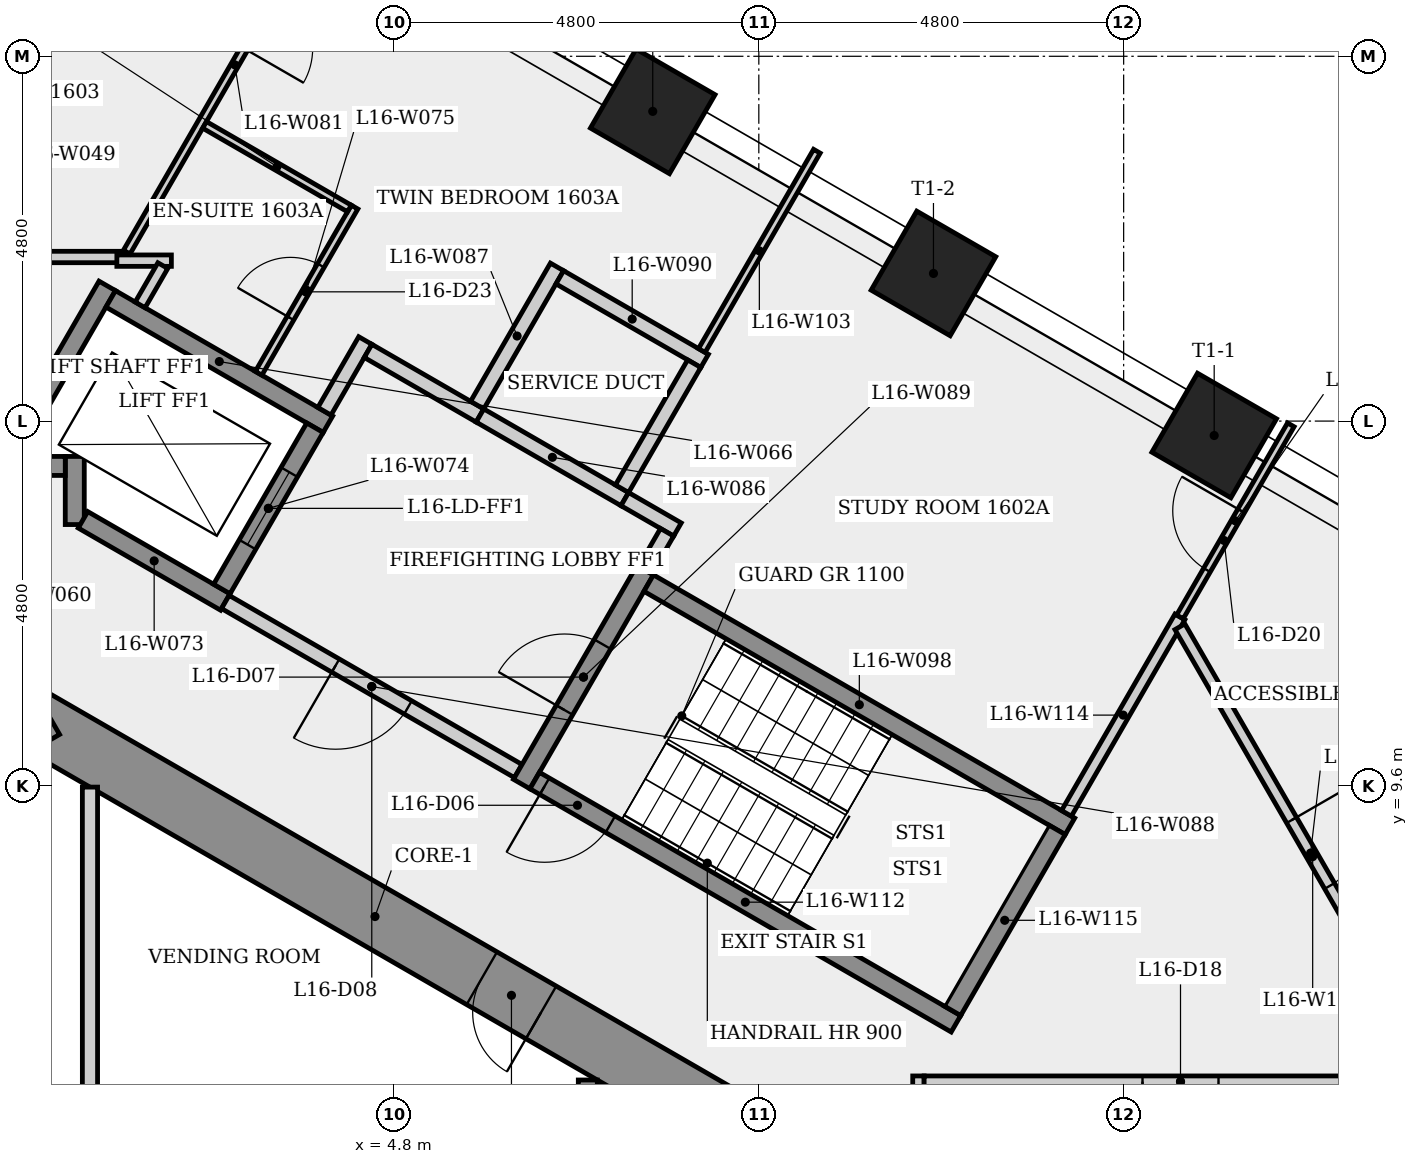
"""IFC4 building model, lengths in metres.
Left out: names, types, materials, properties, quantities, classifications, styles, units other than length and angle.
Written with IfcOpenShell. Run it as: python <this file> out.ifc"""

import sys

from ifc_helpers import new_model, si_unit, direction, frame, frame_2d, origin, origin_2d, place, context, subcontext, project, spatial, rectangle, extrude, element, fill, save


model = new_model("IFC4")
c1 = context("Model", 3, precision=1e-05, world=origin(), true_north=direction((0.0, 1.0)))
c2 = subcontext(c1, "Body", "Model", "MODEL_VIEW")
j1 = project(units=[si_unit("LENGTHUNIT", "METRE"), si_unit("PLANEANGLEUNIT", "RADIAN")], contexts=[c1])
p1 = place(None, origin())
s1 = spatial("IfcSite", under=j1, at=p1, CompositionType="ELEMENT")
p2 = place(p1, origin())
s2 = spatial("IfcBuilding", under=s1, at=p2, CompositionType="ELEMENT")
p3 = place(p2, frame((0.0, 0.0, 62.9)))
s3 = spatial("IfcBuildingStorey", under=s2, at=p3, CompositionType="ELEMENT", Elevation=62.9)
p4 = place(p3, frame((9.3, 5.138, 0.0), z_axis=(0.0, 0.0, 1.0), x_axis=(-0.866023993627, 0.500002442456, 0.0)))
e1 = element("IfcWall", 1, at=p4, inside=s3, PredefinedType="SHEAR", context=c2, shape_type="SweptSolid", body=[
    extrude(rectangle(XDim=10.97, YDim=0.8, at=frame_2d((5.485, 0.0))), origin(), (0.0, 0.0, 1.0), 3.4),
])
p5 = place(p4, frame((2.962, 0.0, 0.0)))
e2 = element("IfcOpeningElement", 2, at=p5, cuts=e1, PredefinedType="OPENING", context=c2, shape_type="SweptSolid", body=[
    extrude(rectangle(XDim=0.9, YDim=2.1, at=frame_2d((0.45, 1.05))), frame((0.0, 0.41, 0.0), z_axis=(0.0, -1.0, 0.0), x_axis=(1.0, 0.0, 0.0)), (0.0, 0.0, 1.0), 0.82),
])
p6 = place(p3, frame((0.2, 10.623, 0.0), z_axis=(0.0, 0.0, 1.0), x_axis=(-0.866023993627, -0.500002442456, 0.0)))
e3 = element("IfcWall", 3, at=p6, inside=s3, PredefinedType="SHEAR", context=c2, shape_type="SweptSolid", body=[
    extrude(rectangle(XDim=10.97, YDim=0.8, at=frame_2d((5.485, 0.0))), origin(), (0.0, 0.0, 1.0), 3.4),
])
p7 = place(p6, frame((9.325, 0.0, 0.0)))
e4 = element("IfcOpeningElement", 4, at=p7, cuts=e3, PredefinedType="OPENING", context=c2, shape_type="SweptSolid", body=[
    extrude(rectangle(XDim=0.9, YDim=2.1, at=frame_2d((0.45, 1.05))), frame((0.0, 0.41, 0.0), z_axis=(0.0, -1.0, 0.0), x_axis=(1.0, 0.0, 0.0)), (0.0, 0.0, 1.0), 0.82),
])
p8 = place(p6, frame((2.091, 0.0, 0.0)))
e5 = element("IfcOpeningElement", 5, at=p8, cuts=e3, PredefinedType="OPENING", context=c2, shape_type="SweptSolid", body=[
    extrude(rectangle(XDim=0.9, YDim=2.1, at=frame_2d((0.45, 1.05))), frame((0.0, 0.41, 0.0), z_axis=(0.0, -1.0, 0.0), x_axis=(1.0, 0.0, 0.0)), (0.0, 0.0, 1.0), 0.82),
])
for number, where, z_axis, x_axis in (
    (6, (15.591, 14.21, 0.0), (0.0, 0.0, 1.0), (0.5, 0.866, 0.0)),
    (7, (11.898, 16.343, 0.0), (0.0, 0.0, 1.0), (0.5, 0.866, 0.0)),
    (8, (8.204, 18.475, 0.0), (0.0, 0.0, 1.0), (0.5, 0.866, 0.0)),
):
    element("IfcColumn", number, at=place(p3, frame(where, z_axis=z_axis, x_axis=x_axis)), inside=s3, PredefinedType="COLUMN", context=c2, shape_type="SweptSolid", body=[
        extrude(rectangle(XDim=1.2, YDim=1.2, at=origin_2d()), origin(), (0.0, 0.0, 1.0), 3.4),
    ])
p9 = place(p3, frame((-3.044, 16.559, 0.0), z_axis=(0.0, 0.0, 1.0), x_axis=(1.0, 0.0, 0.0)))
e9 = element("IfcWall", 9, at=p9, inside=s3, PredefinedType="PARTITIONING", context=c2, shape_type="SweptSolid", body=[
    extrude(rectangle(XDim=4.365, YDim=0.15, at=frame_2d((2.183, 0.0))), origin(), (0.0, 0.0, 1.0), 3.0),
])
p10 = place(p9, frame((1.683, 0.0, 0.0)))
e10 = element("IfcOpeningElement", 10, at=p10, cuts=e9, PredefinedType="OPENING", context=c2, shape_type="SweptSolid", body=[
    extrude(rectangle(XDim=1.0, YDim=2.1, at=frame_2d((0.5, 1.05))), frame((0.0, 0.085, 0.0), z_axis=(0.0, -1.0, 0.0), x_axis=(1.0, 0.0, 0.0)), (0.0, 0.0, 1.0), 0.17),
])
p11 = place(p3, frame((-0.403, 13.702, 0.0), z_axis=(0.0, 0.0, 1.0), x_axis=(0.499976111731, 0.866039195244, 0.0)))
e11 = element("IfcWall", 11, at=p11, inside=s3, PredefinedType="SHEAR", context=c2, shape_type="SweptSolid", body=[
    extrude(rectangle(XDim=2.861, YDim=0.25, at=frame_2d((1.43, 0.0))), origin(), (0.0, 0.0, 1.0), 3.0),
])
p12 = place(p3, frame((0.6, 13.039, 0.0), z_axis=(0.0, 0.0, 1.0), x_axis=(0.0, 1.0, 0.0)))
e12 = element("IfcWall", 12, at=p12, inside=s3, PredefinedType="SHEAR", context=c2, shape_type="SweptSolid", body=[
    extrude(rectangle(XDim=0.896, YDim=0.25, at=frame_2d((0.448, 0.0))), origin(), (0.0, 0.0, 1.0), 3.0),
])
p13 = place(p3, frame((0.475, 13.81, 0.0), z_axis=(0.0, 0.0, 1.0), x_axis=(-1.0, 0.0, 0.0)))
e13 = element("IfcWall", 13, at=p13, inside=s3, PredefinedType="SHEAR", context=c2, shape_type="SweptSolid", body=[
    extrude(rectangle(XDim=0.691, YDim=0.25, at=frame_2d((0.345, 0.0))), origin(), (0.0, 0.0, 1.0), 3.4),
])
p14 = place(p3, frame((0.8, 9.584, 0.0), z_axis=(0.0, 0.0, 1.0), x_axis=(0.0, -1.0, 0.0)))
e14 = element("IfcWall", 14, at=p14, inside=s3, PredefinedType="PARTITIONING", context=c2, shape_type="SweptSolid", body=[
    extrude(rectangle(XDim=4.309, YDim=0.2, at=frame_2d((2.155, 0.0))), origin(), (0.0, 0.0, 1.0), 3.0),
])
p15 = place(p3, frame((1.073, 16.008, 0.0), z_axis=(0.0, 0.0, 1.0), x_axis=(0.866040211805, -0.499974350878, 0.0)))
e15 = element("IfcWall", 15, at=p15, inside=s3, PredefinedType="SHEAR", context=c2, shape_type="SweptSolid", body=[
    extrude(rectangle(XDim=3.3, YDim=0.25, at=frame_2d((1.65, 0.0))), origin(), (0.0, 0.0, 1.0), 3.0),
])
p16 = place(p3, frame((1.154, 16.511, 0.0), z_axis=(0.0, 0.0, 1.0), x_axis=(1.0, 0.0, 0.0)))
e16 = element("IfcWall", 16, at=p16, inside=s3, PredefinedType="PARTITIONING", context=c2, shape_type="SweptSolid", body=[
    extrude(rectangle(XDim=0.717, YDim=0.15, at=frame_2d((0.359, 0.0))), origin(), (0.0, 0.0, 1.0), 3.0),
])
p17 = place(p3, frame((1.759, 16.446, 0.0), z_axis=(0.0, 0.0, 1.0), x_axis=(-0.499746055734, -0.86617196894, 0.0)))
e17 = element("IfcWall", 17, at=p17, inside=s3, PredefinedType="PARTITIONING", context=c2, shape_type="SweptSolid", body=[
    extrude(rectangle(XDim=0.597, YDim=0.15, at=frame_2d((0.298, 0.0))), origin(), (0.0, 0.0, 1.0), 3.0),
])
p18 = place(p3, frame((2.581, 12.02, 0.0), z_axis=(0.0, 0.0, 1.0), x_axis=(-0.86603892542, 0.499976579108, 0.0)))
e18 = element("IfcWall", 18, at=p18, inside=s3, PredefinedType="SHEAR", context=c2, shape_type="SweptSolid", body=[
    extrude(rectangle(XDim=2.162, YDim=0.25, at=frame_2d((1.081, 0.0))), origin(), (0.0, 0.0, 1.0), 3.0),
])
p19 = place(p3, frame((2.535, 12.191, 0.0), z_axis=(0.0, 0.0, 1.0), x_axis=(0.500061746146, 0.865989751695, 0.0)))
e19 = element("IfcWall", 19, at=p19, inside=s3, PredefinedType="SHEAR", context=c2, shape_type="SweptSolid", body=[
    extrude(rectangle(XDim=2.45, YDim=0.25, at=frame_2d((1.225, 0.0))), origin(), (0.0, 0.0, 1.0), 3.4),
])
p20 = place(p19, frame((0.675, 0.0, 0.0)))
e20 = element("IfcOpeningElement", 20, at=p20, cuts=e19, PredefinedType="OPENING", context=c2, shape_type="SweptSolid", body=[
    extrude(rectangle(XDim=1.1, YDim=2.1, at=frame_2d((0.55, 1.05))), frame((0.0, 0.135, 0.0), z_axis=(0.0, -1.0, 0.0), x_axis=(1.0, 0.0, 0.0)), (0.0, 0.0, 1.0), 0.27),
])
p21 = place(p3, frame((3.019, 15.029, 0.0), z_axis=(0.0, 0.0, 1.0), x_axis=(0.499976333282, 0.866039067339, 0.0)))
e21 = element("IfcWall", 21, at=p21, inside=s3, PredefinedType="PARTITIONING", context=c2, shape_type="SweptSolid", body=[
    extrude(rectangle(XDim=2.525, YDim=0.1, at=frame_2d((1.262, 0.0))), origin(), (0.0, 0.0, 1.0), 3.0),
])
p22 = place(p21, frame((0.837, 0.0, 0.0)))
e22 = element("IfcOpeningElement", 22, at=p22, cuts=e21, PredefinedType="OPENING", context=c2, shape_type="SweptSolid", body=[
    extrude(rectangle(XDim=0.8, YDim=2.1, at=frame_2d((0.4, 1.05))), frame((0.0, 0.06, 0.0), z_axis=(0.0, -1.0, 0.0), x_axis=(1.0, 0.0, 0.0)), (0.0, 0.0, 1.0), 0.12),
])
p23 = place(p3, frame((3.885, 14.529, 0.0), z_axis=(0.0, 0.0, 1.0), x_axis=(0.499997628298, 0.866026773083, 0.0)))
e23 = element("IfcWall", 23, at=p23, inside=s3, PredefinedType="PARTITIONING", context=c2, shape_type="SweptSolid", body=[
    extrude(rectangle(XDim=1.075, YDim=0.2, at=frame_2d((0.538, 0.0))), origin(), (0.0, 0.0, 1.0), 3.0),
])
p24 = place(p3, frame((4.128, 21.551, 0.0), z_axis=(0.0, 0.0, 1.0), x_axis=(-0.499983721286, -0.8660348021, 0.0)))
e24 = element("IfcWall", 24, at=p24, inside=s3, PredefinedType="PARTITIONING", context=c2, shape_type="SweptSolid", body=[
    extrude(rectangle(XDim=5.689, YDim=0.1, at=frame_2d((2.845, 0.0))), origin(), (0.0, 0.0, 1.0), 3.0),
])
p25 = place(p24, frame((1.697, 0.0, 0.0)))
e25 = element("IfcOpeningElement", 25, at=p25, cuts=e24, PredefinedType="OPENING", context=c2, shape_type="SweptSolid", body=[
    extrude(rectangle(XDim=0.9, YDim=2.1, at=frame_2d((0.45, 1.05))), frame((0.0, 0.06, 0.0), z_axis=(0.0, -1.0, 0.0), x_axis=(1.0, 0.0, 0.0)), (0.0, 0.0, 1.0), 0.12),
])
p26 = place(p3, frame((4.213, 17.198, 0.0), z_axis=(0.0, 0.0, 1.0), x_axis=(-0.86605622881, 0.499946605688, 0.0)))
e26 = element("IfcWall", 26, at=p26, inside=s3, PredefinedType="PARTITIONING", context=c2, shape_type="SweptSolid", body=[
    extrude(rectangle(XDim=2.2, YDim=0.1, at=frame_2d((1.1, 0.0))), origin(), (0.0, 0.0, 1.0), 3.0),
])
p27 = place(p3, frame((4.459, 15.323, 0.0), z_axis=(0.0, 0.0, 1.0), x_axis=(0.866025371046, -0.500000056704, 0.0)))
e27 = element("IfcWall", 27, at=p27, inside=s3, PredefinedType="PARTITIONING", context=c2, shape_type="SweptSolid", body=[
    extrude(rectangle(XDim=1.7, YDim=0.2, at=frame_2d((0.85, 0.0))), origin(), (0.0, 0.0, 1.0), 3.0),
])
p28 = place(p3, frame((5.931, 14.473, 0.0), z_axis=(0.0, 0.0, 1.0), x_axis=(0.866008176907, -0.50002983664, 0.0)))
e28 = element("IfcWall", 28, at=p28, inside=s3, PredefinedType="PLUMBINGWALL", context=c2, shape_type="SweptSolid", body=[
    extrude(rectangle(XDim=2.2, YDim=0.2, at=frame_2d((1.1, 0.0))), origin(), (0.0, 0.0, 1.0), 3.0),
])
p29 = place(p3, frame((5.895, 14.61, 0.0), z_axis=(0.0, 0.0, 1.0), x_axis=(0.49994051562, 0.866059744384, 0.0)))
e29 = element("IfcWall", 29, at=p29, inside=s3, PredefinedType="PLUMBINGWALL", context=c2, shape_type="SweptSolid", body=[
    extrude(rectangle(XDim=2.1, YDim=0.2, at=frame_2d((1.05, 0.0))), origin(), (0.0, 0.0, 1.0), 3.0),
])
p30 = place(p3, frame((6.435, 9.795, 0.0), z_axis=(0.0, 0.0, 1.0), x_axis=(-0.866012907634, 0.500021643343, 0.0)))
e30 = element("IfcWall", 30, at=p30, inside=s3, PredefinedType="PARTITIONING", context=c2, shape_type="SweptSolid", body=[
    extrude(rectangle(XDim=4.45, YDim=0.2, at=frame_2d((2.225, 0.0))), origin(), (0.0, 0.0, 1.0), 3.0),
])
p31 = place(p30, frame((1.675, 0.0, 0.0)))
e31 = element("IfcOpeningElement", 31, at=p31, cuts=e30, PredefinedType="OPENING", context=c2, shape_type="SweptSolid", body=[
    extrude(rectangle(XDim=1.1, YDim=2.1, at=frame_2d((0.55, 1.05))), frame((0.0, 0.11, 0.0), z_axis=(0.0, -1.0, 0.0), x_axis=(1.0, 0.0, 0.0)), (0.0, 0.0, 1.0), 0.22),
])
p32 = place(p3, frame((6.48, 9.624, 0.0), z_axis=(0.0, 0.0, 1.0), x_axis=(0.500017246033, 0.866015446554, 0.0)))
e32 = element("IfcWall", 32, at=p32, inside=s3, PredefinedType="SHEAR", context=c2, shape_type="SweptSolid", body=[
    extrude(rectangle(XDim=3.25, YDim=0.25, at=frame_2d((1.625, 0.0))), origin(), (0.0, 0.0, 1.0), 3.0),
])
p33 = place(p32, frame((1.125, 0.0, 0.0)))
e33 = element("IfcOpeningElement", 33, at=p33, cuts=e32, PredefinedType="OPENING", context=c2, shape_type="SweptSolid", body=[
    extrude(rectangle(XDim=1.0, YDim=2.1, at=frame_2d((0.5, 1.05))), frame((0.0, 0.135, 0.0), z_axis=(0.0, -1.0, 0.0), x_axis=(1.0, 0.0, 0.0)), (0.0, 0.0, 1.0), 0.27),
])
p34 = place(p3, frame((6.981, 16.292, 0.0), z_axis=(0.0, 0.0, 1.0), x_axis=(0.866035918664, -0.499981787252, 0.0)))
e34 = element("IfcWall", 34, at=p34, inside=s3, PredefinedType="PLUMBINGWALL", context=c2, shape_type="SweptSolid", body=[
    extrude(rectangle(XDim=2.2, YDim=0.2, at=frame_2d((1.1, 0.0))), origin(), (0.0, 0.0, 1.0), 3.0),
])
p35 = place(p3, frame((7.35, 5.73, 0.0), z_axis=(0.0, 0.0, 1.0), x_axis=(0.0, -1.0, 0.0)))
e35 = element("IfcWall", 35, at=p35, inside=s3, PredefinedType="SHEAR", context=c2, shape_type="SweptSolid", body=[
    extrude(rectangle(XDim=3.805, YDim=0.25, at=frame_2d((1.903, 0.0))), origin(), (0.0, 0.0, 1.0), 3.0),
])
p36 = place(p3, frame((7.836, 13.373, 0.0), z_axis=(0.0, 0.0, 1.0), x_axis=(0.866094119867, -0.499880961361, 0.0)))
e36 = element("IfcWall", 36, at=p36, inside=s3, PredefinedType="PARTITIONING", context=c2, shape_type="SweptSolid", body=[
    extrude(rectangle(XDim=0.8, YDim=0.2, at=frame_2d((0.4, 0.0))), origin(), (0.0, 0.0, 1.0), 3.0),
])
p37 = place(p3, frame((8.151, 12.268, 0.0), z_axis=(0.0, 0.0, 1.0), x_axis=(0.866025499775, -0.499999833739, 0.0)))
e37 = element("IfcWall", 37, at=p37, inside=s3, PredefinedType="SHEAR", context=c2, shape_type="SweptSolid", body=[
    extrude(rectangle(XDim=6.4, YDim=0.25, at=frame_2d((3.2, 0.0))), origin(), (0.0, 0.0, 1.0), 3.0),
])
p38 = place(p3, frame((8.393, 12.937, 0.0), z_axis=(0.0, 0.0, 1.0), x_axis=(-0.500065409566, -0.86598763626, 0.0)))
e38 = element("IfcWall", 38, at=p38, inside=s3, PredefinedType="PARTITIONING", context=c2, shape_type="SweptSolid", body=[
    extrude(rectangle(XDim=0.575, YDim=0.2, at=frame_2d((0.288, 0.0))), origin(), (0.0, 0.0, 1.0), 3.0),
])
p39 = place(p3, frame((8.85, 15.329, 0.0), z_axis=(0.0, 0.0, 1.0), x_axis=(0.500015609314, 0.866016391555, 0.0)))
e39 = element("IfcWall", 39, at=p39, inside=s3, PredefinedType="PARTITIONING", context=c2, shape_type="SweptSolid", body=[
    extrude(rectangle(XDim=3.028, YDim=0.1, at=frame_2d((1.514, 0.0))), origin(), (0.0, 0.0, 1.0), 3.0),
])
p40 = place(p3, frame((8.75, 15.156, 0.0), z_axis=(0.0, 0.0, 1.0), x_axis=(-0.499967155389, -0.866044365799, 0.0)))
e40 = element("IfcWall", 40, at=p40, inside=s3, PredefinedType="PLUMBINGWALL", context=c2, shape_type="SweptSolid", body=[
    extrude(rectangle(XDim=1.9, YDim=0.2, at=frame_2d((0.95, 0.0))), origin(), (0.0, 0.0, 1.0), 3.0),
])
p41 = place(p3, frame((11.7, -5.634, 0.0), z_axis=(0.0, 0.0, 1.0), x_axis=(0.0, 1.0, 0.0)))
e41 = element("IfcWall", 41, at=p41, inside=s3, PredefinedType="PARTITIONING", context=c2, shape_type="SweptSolid", body=[
    extrude(rectangle(XDim=11.417, YDim=0.15, at=frame_2d((5.708, 0.0))), origin(), (0.0, 0.0, 1.0), 3.0),
])
p42 = place(p3, frame((12.194, 6.47, 0.0), z_axis=(0.0, 0.0, 1.0), x_axis=(-0.866025499775, 0.499999833739, 0.0)))
e42 = element("IfcWall", 42, at=p42, inside=s3, PredefinedType="SHEAR", context=c2, shape_type="SweptSolid", body=[
    extrude(rectangle(XDim=6.4, YDim=0.25, at=frame_2d((3.2, 0.0))), origin(), (0.0, 0.0, 1.0), 3.0),
])
p43 = place(p42, frame((5.25, 0.0, 0.0)))
e43 = element("IfcOpeningElement", 43, at=p43, cuts=e42, PredefinedType="OPENING", context=c2, shape_type="SweptSolid", body=[
    extrude(rectangle(XDim=1.0, YDim=2.1, at=frame_2d((0.5, 1.05))), frame((0.0, 0.135, 0.0), z_axis=(0.0, -1.0, 0.0), x_axis=(1.0, 0.0, 0.0)), (0.0, 0.0, 1.0), 0.27),
])
p44 = place(p3, frame((13.648, 9.239, 0.0), z_axis=(0.0, 0.0, 1.0), x_axis=(0.500026865748, 0.866009892282, 0.0)))
e44 = element("IfcWall", 44, at=p44, inside=s3, PredefinedType="PARTITIONING", context=c2, shape_type="SweptSolid", body=[
    extrude(rectangle(XDim=2.985, YDim=0.15, at=frame_2d((1.493, 0.0))), origin(), (0.0, 0.0, 1.0), 3.0),
])
p45 = place(p3, frame((13.523, 9.022, 0.0), z_axis=(0.0, 0.0, 1.0), x_axis=(-0.500034990121, -0.866005201286, 0.0)))
e45 = element("IfcWall", 45, at=p45, inside=s3, PredefinedType="SHEAR", context=c2, shape_type="SweptSolid", body=[
    extrude(rectangle(XDim=2.75, YDim=0.25, at=frame_2d((1.375, 0.0))), origin(), (0.0, 0.0, 1.0), 3.0),
])
p46 = place(p3, frame((15.14, 11.824, 0.0), z_axis=(0.0, 0.0, 1.0), x_axis=(0.500026652407, 0.866010015463, 0.0)))
e46 = element("IfcWall", 46, at=p46, inside=s3, PredefinedType="PARTITIONING", context=c2, shape_type="SweptSolid", body=[
    extrude(rectangle(XDim=2.918, YDim=0.1, at=frame_2d((1.459, 0.0))), origin(), (0.0, 0.0, 1.0), 3.0),
])
p47 = place(p46, frame((0.711, 0.0, 0.0)))
e47 = element("IfcOpeningElement", 47, at=p47, cuts=e46, PredefinedType="OPENING", context=c2, shape_type="SweptSolid", body=[
    extrude(rectangle(XDim=0.9, YDim=2.1, at=frame_2d((0.45, 1.05))), frame((0.0, 0.06, 0.0), z_axis=(0.0, -1.0, 0.0), x_axis=(1.0, 0.0, 0.0)), (0.0, 0.0, 1.0), 0.12),
])
p48 = place(p3, frame((15.14, 11.694, 0.0), z_axis=(0.0, 0.0, 1.0), x_axis=(0.500013845068, -0.866017410183, 0.0)))
e48 = element("IfcWall", 48, at=p48, inside=s3, PredefinedType="PARTITIONING", context=c2, shape_type="SweptSolid", body=[
    extrude(rectangle(XDim=6.987, YDim=0.15, at=frame_2d((3.493, 0.0))), origin(), (0.0, 0.0, 1.0), 3.0),
])
p49 = place(p48, frame((2.938, 0.0, 0.0)))
e49 = element("IfcOpeningElement", 49, at=p49, cuts=e48, PredefinedType="OPENING", context=c2, shape_type="SweptSolid", body=[
    extrude(rectangle(XDim=1.0, YDim=2.1, at=frame_2d((0.5, 1.05))), frame((0.0, 0.085, 0.0), z_axis=(0.0, -1.0, 0.0), x_axis=(1.0, 0.0, 0.0)), (0.0, 0.0, 1.0), 0.17),
])
p50 = place(p3, frame((18.521, 5.708, 0.0), z_axis=(0.0, 0.0, 1.0), x_axis=(-1.0, 0.0, 0.0)))
e50 = element("IfcWall", 50, at=p50, inside=s3, PredefinedType="PARTITIONING", context=c2, shape_type="SweptSolid", body=[
    extrude(rectangle(XDim=6.746, YDim=0.15, at=frame_2d((3.373, 0.0))), origin(), (0.0, 0.0, 1.0), 3.0),
])
p51 = place(p50, frame((2.873, 0.0, 0.0)))
e51 = element("IfcOpeningElement", 51, at=p51, cuts=e50, PredefinedType="OPENING", context=c2, shape_type="SweptSolid", body=[
    extrude(rectangle(XDim=1.0, YDim=2.1, at=frame_2d((0.5, 1.05))), frame((0.0, 0.085, 0.0), z_axis=(0.0, -1.0, 0.0), x_axis=(1.0, 0.0, 0.0)), (0.0, 0.0, 1.0), 0.17),
])
p52 = place(p43, origin())
e52 = element("IfcDoor", 52, at=p52, inside=s3, OperationType="SINGLE_SWING_RIGHT", PredefinedType="DOOR", context=c2, shape_type="SweptSolid", body=[
    extrude(rectangle(XDim=1.0, YDim=2.1, at=frame_2d((0.5, 1.05))), frame((0.0, 0.025, 0.0), z_axis=(0.0, -1.0, 0.0), x_axis=(1.0, 0.0, 0.0)), (0.0, 0.0, 1.0), 0.05),
])
fill(e43, e52)
p53 = place(p33, origin())
e53 = element("IfcDoor", 53, at=p53, inside=s3, OperationType="SINGLE_SWING_LEFT", PredefinedType="DOOR", context=c2, shape_type="SweptSolid", body=[
    extrude(rectangle(XDim=1.0, YDim=2.1, at=frame_2d((0.5, 1.05))), frame((0.0, 0.025, 0.0), z_axis=(0.0, -1.0, 0.0), x_axis=(1.0, 0.0, 0.0)), (0.0, 0.0, 1.0), 0.05),
])
fill(e33, e53)
p54 = place(p31, origin())
e54 = element("IfcDoor", 54, at=p54, inside=s3, OperationType="SINGLE_SWING_RIGHT", PredefinedType="DOOR", context=c2, shape_type="SweptSolid", body=[
    extrude(rectangle(XDim=1.1, YDim=2.1, at=frame_2d((0.55, 1.05))), frame((0.0, 0.025, 0.0), z_axis=(0.0, -1.0, 0.0), x_axis=(1.0, 0.0, 0.0)), (0.0, 0.0, 1.0), 0.05),
])
fill(e31, e54)
p55 = place(p20, origin())
e55 = element("IfcDoor", 55, at=p55, inside=s3, OperationType="SLIDING_TO_LEFT", PredefinedType="DOOR", context=c2, shape_type="SweptSolid", body=[
    extrude(rectangle(XDim=1.1, YDim=2.1, at=frame_2d((0.55, 1.05))), frame((0.0, 0.025, 0.0), z_axis=(0.0, -1.0, 0.0), x_axis=(1.0, 0.0, 0.0)), (0.0, 0.0, 1.0), 0.05),
])
fill(e20, e55)
p56 = place(p51, origin())
e56 = element("IfcDoor", 56, at=p56, inside=s3, OperationType="SINGLE_SWING_RIGHT", PredefinedType="DOOR", context=c2, shape_type="SweptSolid", body=[
    extrude(rectangle(XDim=1.0, YDim=2.1, at=frame_2d((0.5, 1.05))), frame((0.0, 0.025, 0.0), z_axis=(0.0, -1.0, 0.0), x_axis=(1.0, 0.0, 0.0)), (0.0, 0.0, 1.0), 0.05),
])
fill(e51, e56)
p57 = place(p49, origin())
e57 = element("IfcDoor", 57, at=p57, inside=s3, OperationType="SINGLE_SWING_LEFT", PredefinedType="DOOR", context=c2, shape_type="SweptSolid", body=[
    extrude(rectangle(XDim=1.0, YDim=2.1, at=frame_2d((0.5, 1.05))), frame((0.0, 0.025, 0.0), z_axis=(0.0, -1.0, 0.0), x_axis=(1.0, 0.0, 0.0)), (0.0, 0.0, 1.0), 0.05),
])
fill(e49, e57)
p58 = place(p47, origin())
e58 = element("IfcDoor", 58, at=p58, inside=s3, OperationType="SINGLE_SWING_RIGHT", PredefinedType="DOOR", context=c2, shape_type="SweptSolid", body=[
    extrude(rectangle(XDim=0.9, YDim=2.1, at=frame_2d((0.45, 1.05))), frame((0.0, 0.025, 0.0), z_axis=(0.0, -1.0, 0.0), x_axis=(1.0, 0.0, 0.0)), (0.0, 0.0, 1.0), 0.05),
])
fill(e47, e58)
p59 = place(p22, origin())
e59 = element("IfcDoor", 59, at=p59, inside=s3, OperationType="SINGLE_SWING_LEFT", PredefinedType="DOOR", context=c2, shape_type="SweptSolid", body=[
    extrude(rectangle(XDim=0.8, YDim=2.1, at=frame_2d((0.4, 1.05))), frame((0.0, 0.025, 0.0), z_axis=(0.0, -1.0, 0.0), x_axis=(1.0, 0.0, 0.0)), (0.0, 0.0, 1.0), 0.05),
])
fill(e22, e59)
p60 = place(p5, origin())
e60 = element("IfcDoor", 60, at=p60, inside=s3, OperationType="SINGLE_SWING_LEFT", PredefinedType="DOOR", context=c2, shape_type="SweptSolid", body=[
    extrude(rectangle(XDim=0.9, YDim=2.1, at=frame_2d((0.45, 1.05))), frame((0.0, 0.025, 0.0), z_axis=(0.0, -1.0, 0.0), x_axis=(1.0, 0.0, 0.0)), (0.0, 0.0, 1.0), 0.05),
])
fill(e2, e60)
save(model, sys.argv[1])
